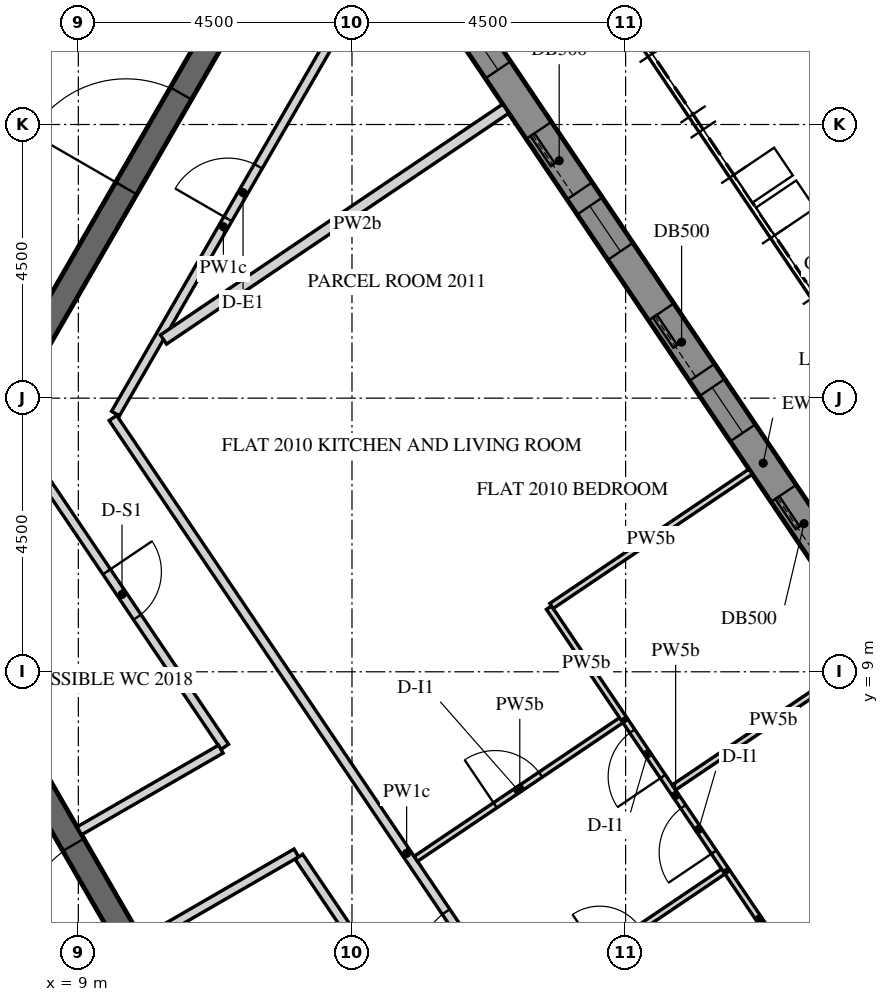
"""IFC4 building model, lengths in metres.
Left out: names, types, materials, properties, quantities, classifications, styles, units other than length and angle.
Written with IfcOpenShell. Run it as: python <this file> out.ifc"""

import sys

from ifc_helpers import new_model, si_unit, direction, frame, frame_2d, origin, place, context, subcontext, project, spatial, polyline, rectangle, outline, extrude, element, fill, save


model = new_model("IFC4")
c1 = context("Model", 3, precision=1e-05, world=origin(), true_north=direction((0.0, 1.0)))
c2 = subcontext(c1, "Body", "Model", "MODEL_VIEW")
j1 = project(units=[si_unit("LENGTHUNIT", "METRE"), si_unit("PLANEANGLEUNIT", "RADIAN")], contexts=[c1])
p1 = place(None, origin())
s1 = spatial("IfcSite", under=j1, at=p1, CompositionType="ELEMENT")
p2 = place(p1, origin())
s2 = spatial("IfcBuilding", under=s1, at=p2, CompositionType="ELEMENT")
p3 = place(p2, frame((0.0, 0.0, 256.2)))
s3 = spatial("IfcBuildingStorey", under=s2, at=p3, CompositionType="ELEMENT", Elevation=256.2)
p4 = place(p3, frame((26.706, 2.879, 0.0), z_axis=(0.0, 0.0, 1.0), x_axis=(-0.559197891507, 0.829034208061, 0.0)))
e1 = element("IfcWall", 1, at=p4, inside=s3, PredefinedType="SOLIDWALL", context=c2, shape_type="SweptSolid", body=[
    extrude(outline(polyline([(0.25, -0.25), (22.795, -0.25), (23.295, 0.25), (-0.25, 0.25), (0.25, -0.25)])), origin(), (0.0, 0.0, 1.0), 3.75),
])
p5 = place(p4, frame((1.323, 0.0, 0.9)))
e2 = element("IfcOpeningElement", 2, at=p5, cuts=e1, PredefinedType="OPENING", context=c2, shape_type="SweptSolid", body=[
    extrude(rectangle(XDim=0.9, YDim=1.5, at=frame_2d((0.45, 0.75))), frame((0.0, 0.26, 0.0), z_axis=(0.0, -1.0, 0.0), x_axis=(1.0, 0.0, 0.0)), (0.0, 0.0, 1.0), 0.52),
])
p6 = place(p4, frame((2.522, 0.0, 0.0)))
e3 = element("IfcOpeningElement", 3, at=p6, cuts=e1, PredefinedType="OPENING", context=c2, shape_type="SweptSolid", body=[
    extrude(rectangle(XDim=1.2, YDim=2.4, at=frame_2d((0.6, 1.2))), frame((0.0, 0.26, 0.0), z_axis=(0.0, -1.0, 0.0), x_axis=(1.0, 0.0, 0.0)), (0.0, 0.0, 1.0), 0.52),
])
p7 = place(p4, frame((4.922, 0.0, 0.9)))
e4 = element("IfcOpeningElement", 4, at=p7, cuts=e1, PredefinedType="OPENING", context=c2, shape_type="SweptSolid", body=[
    extrude(rectangle(XDim=0.9, YDim=1.5, at=frame_2d((0.45, 0.75))), frame((0.0, 0.26, 0.0), z_axis=(0.0, -1.0, 0.0), x_axis=(1.0, 0.0, 0.0)), (0.0, 0.0, 1.0), 0.52),
])
p8 = place(p4, frame((6.122, 0.0, 0.0)))
e5 = element("IfcOpeningElement", 5, at=p8, cuts=e1, PredefinedType="OPENING", context=c2, shape_type="SweptSolid", body=[
    extrude(rectangle(XDim=1.2, YDim=2.4, at=frame_2d((0.6, 1.2))), frame((0.0, 0.26, 0.0), z_axis=(0.0, -1.0, 0.0), x_axis=(1.0, 0.0, 0.0)), (0.0, 0.0, 1.0), 0.52),
])
p9 = place(p4, frame((8.522, 0.0, 0.9)))
e6 = element("IfcOpeningElement", 6, at=p9, cuts=e1, PredefinedType="OPENING", context=c2, shape_type="SweptSolid", body=[
    extrude(rectangle(XDim=0.9, YDim=1.5, at=frame_2d((0.45, 0.75))), frame((0.0, 0.26, 0.0), z_axis=(0.0, -1.0, 0.0), x_axis=(1.0, 0.0, 0.0)), (0.0, 0.0, 1.0), 0.52),
])
p10 = place(p4, frame((9.722, 0.0, 0.0)))
e7 = element("IfcOpeningElement", 7, at=p10, cuts=e1, PredefinedType="OPENING", context=c2, shape_type="SweptSolid", body=[
    extrude(rectangle(XDim=1.2, YDim=2.4, at=frame_2d((0.6, 1.2))), frame((0.0, 0.26, 0.0), z_axis=(0.0, -1.0, 0.0), x_axis=(1.0, 0.0, 0.0)), (0.0, 0.0, 1.0), 0.52),
])
p11 = place(p4, frame((12.122, 0.0, 0.9)))
e8 = element("IfcOpeningElement", 8, at=p11, cuts=e1, PredefinedType="OPENING", context=c2, shape_type="SweptSolid", body=[
    extrude(rectangle(XDim=0.9, YDim=1.5, at=frame_2d((0.45, 0.75))), frame((0.0, 0.26, 0.0), z_axis=(0.0, -1.0, 0.0), x_axis=(1.0, 0.0, 0.0)), (0.0, 0.0, 1.0), 0.52),
])
p12 = place(p4, frame((13.323, 0.0, 0.0)))
e9 = element("IfcOpeningElement", 9, at=p12, cuts=e1, PredefinedType="OPENING", context=c2, shape_type="SweptSolid", body=[
    extrude(rectangle(XDim=1.2, YDim=2.4, at=frame_2d((0.6, 1.2))), frame((0.0, 0.26, 0.0), z_axis=(0.0, -1.0, 0.0), x_axis=(1.0, 0.0, 0.0)), (0.0, 0.0, 1.0), 0.52),
])
p13 = place(p4, frame((15.722, 0.0, 0.9)))
e10 = element("IfcOpeningElement", 10, at=p13, cuts=e1, PredefinedType="OPENING", context=c2, shape_type="SweptSolid", body=[
    extrude(rectangle(XDim=0.9, YDim=1.5, at=frame_2d((0.45, 0.75))), frame((0.0, 0.26, 0.0), z_axis=(0.0, -1.0, 0.0), x_axis=(1.0, 0.0, 0.0)), (0.0, 0.0, 1.0), 0.52),
])
p14 = place(p4, frame((16.922, 0.0, 0.0)))
e11 = element("IfcOpeningElement", 11, at=p14, cuts=e1, PredefinedType="OPENING", context=c2, shape_type="SweptSolid", body=[
    extrude(rectangle(XDim=1.2, YDim=2.4, at=frame_2d((0.6, 1.2))), frame((0.0, 0.26, 0.0), z_axis=(0.0, -1.0, 0.0), x_axis=(1.0, 0.0, 0.0)), (0.0, 0.0, 1.0), 0.52),
])
p15 = place(p4, frame((19.323, 0.0, 0.9)))
e12 = element("IfcOpeningElement", 12, at=p15, cuts=e1, PredefinedType="OPENING", context=c2, shape_type="SweptSolid", body=[
    extrude(rectangle(XDim=0.9, YDim=1.5, at=frame_2d((0.45, 0.75))), frame((0.0, 0.26, 0.0), z_axis=(0.0, -1.0, 0.0), x_axis=(1.0, 0.0, 0.0)), (0.0, 0.0, 1.0), 0.52),
])
p16 = place(p4, frame((20.522, 0.0, 0.0)))
e13 = element("IfcOpeningElement", 13, at=p16, cuts=e1, PredefinedType="OPENING", context=c2, shape_type="SweptSolid", body=[
    extrude(rectangle(XDim=1.2, YDim=2.4, at=frame_2d((0.6, 1.2))), frame((0.0, 0.26, 0.0), z_axis=(0.0, -1.0, 0.0), x_axis=(1.0, 0.0, 0.0)), (0.0, 0.0, 1.0), 0.52),
])
p17 = place(p3, frame((12.471, 0.0, 0.0), z_axis=(0.0, 0.0, 1.0), x_axis=(-0.499996419489, 0.866027470984, 0.0)))
e14 = element("IfcWall", 14, at=p17, inside=s3, PredefinedType="SHEAR", context=c2, shape_type="SweptSolid", body=[
    extrude(outline(polyline([(-0.115, -0.2), (12.586, -0.2), (12.355, 0.2), (0.115, 0.2), (-0.115, -0.2)])), origin(), (0.0, 0.0, 1.0), 3.75),
])
p18 = place(p17, frame((5.306, 0.0, 0.0)))
e15 = element("IfcOpeningElement", 15, at=p18, cuts=e14, PredefinedType="OPENING", context=c2, shape_type="SweptSolid", body=[
    extrude(rectangle(XDim=1.8, YDim=2.4, at=frame_2d((0.9, 1.2))), frame((0.0, 0.21, 0.0), z_axis=(0.0, -1.0, 0.0), x_axis=(1.0, 0.0, 0.0)), (0.0, 0.0, 1.0), 0.42),
])
p19 = place(p3, frame((6.351, 11.0, 0.0), z_axis=(0.0, 0.0, 1.0), x_axis=(0.499998894578, 0.866026041999, 0.0)))
e16 = element("IfcWall", 16, at=p19, inside=s3, PredefinedType="SHEAR", context=c2, shape_type="SweptSolid", body=[
    extrude(rectangle(XDim=15.544, YDim=0.4, at=frame_2d((7.772, 0.0))), origin(), (0.0, 0.0, 1.0), 3.75),
])
p20 = place(p19, frame((6.872, 0.0, 0.0)))
e17 = element("IfcOpeningElement", 17, at=p20, cuts=e16, PredefinedType="OPENING", context=c2, shape_type="SweptSolid", body=[
    extrude(rectangle(XDim=1.8, YDim=2.4, at=frame_2d((0.9, 1.2))), frame((0.0, 0.21, 0.0), z_axis=(0.0, -1.0, 0.0), x_axis=(1.0, 0.0, 0.0)), (0.0, 0.0, 1.0), 0.42),
])
p21 = place(p3, frame((19.228, -1.146, 0.0), z_axis=(0.0, 0.0, 1.0), x_axis=(-0.559190017735, 0.829039519001, 0.0)))
e18 = element("IfcWall", 18, at=p21, inside=s3, PredefinedType="PARTITIONING", context=c2, shape_type="SweptSolid", body=[
    extrude(rectangle(XDim=17.273, YDim=0.15, at=frame_2d((8.637, 0.0))), origin(), (0.0, 0.0, 1.0), 2.823),
])
p22 = place(p21, frame((6.478, 0.0, 0.0)))
e19 = element("IfcOpeningElement", 19, at=p22, cuts=e18, PredefinedType="OPENING", context=c2, shape_type="SweptSolid", body=[
    extrude(rectangle(XDim=1.0, YDim=2.1, at=frame_2d((0.5, 1.05))), frame((0.0, 0.085, 0.0), z_axis=(0.0, -1.0, 0.0), x_axis=(1.0, 0.0, 0.0)), (0.0, 0.0, 1.0), 0.17),
])
p23 = place(p3, frame((9.611, 13.246, 0.0), z_axis=(0.0, 0.0, 1.0), x_axis=(0.499994435258, 0.866028616566, 0.0)))
e20 = element("IfcWall", 20, at=p23, inside=s3, PredefinedType="PARTITIONING", context=c2, shape_type="SweptSolid", body=[
    extrude(rectangle(XDim=7.097, YDim=0.15, at=frame_2d((3.548, 0.0))), origin(), (0.0, 0.0, 1.0), 2.823),
])
p24 = place(p23, frame((3.696, 0.0, 0.0)))
e21 = element("IfcOpeningElement", 21, at=p24, cuts=e20, PredefinedType="OPENING", context=c2, shape_type="SweptSolid", body=[
    extrude(rectangle(XDim=1.0, YDim=2.1, at=frame_2d((0.5, 1.05))), frame((0.0, 0.085, 0.0), z_axis=(0.0, -1.0, 0.0), x_axis=(1.0, 0.0, 0.0)), (0.0, 0.0, 1.0), 0.17),
])
p25 = place(p3, frame((10.066, 4.566, 0.0), z_axis=(0.0, 0.0, 1.0), x_axis=(0.866034661658, 0.49998396455, 0.0)))
e22 = element("IfcWall", 22, at=p25, inside=s3, PredefinedType="PARTITIONING", context=c2, shape_type="SweptSolid", body=[
    extrude(rectangle(XDim=2.909, YDim=0.15, at=frame_2d((1.455, 0.0))), origin(), (0.0, 0.0, 1.0), 2.823),
])
p26 = place(p3, frame((12.627, 5.958, 0.0), z_axis=(0.0, 0.0, 1.0), x_axis=(0.559185493191, -0.829042570804, 0.0)))
e23 = element("IfcWall", 23, at=p26, inside=s3, PredefinedType="PARTITIONING", context=c2, shape_type="SweptSolid", body=[
    extrude(rectangle(XDim=8.727, YDim=0.15, at=frame_2d((4.363, 0.0))), origin(), (0.0, 0.0, 1.0), 2.823),
])
p27 = place(p26, frame((3.913, 0.0, 0.0)))
e24 = element("IfcOpeningElement", 24, at=p27, cuts=e23, PredefinedType="OPENING", context=c2, shape_type="SweptSolid", body=[
    extrude(rectangle(XDim=0.9, YDim=2.1, at=frame_2d((0.45, 1.05))), frame((0.0, 0.085, 0.0), z_axis=(0.0, -1.0, 0.0), x_axis=(1.0, 0.0, 0.0)), (0.0, 0.0, 1.0), 0.17),
])
p28 = place(p3, frame((8.028, 12.777, 0.0), z_axis=(0.0, 0.0, 1.0), x_axis=(0.559175239609, -0.829049486707, 0.0)))
e25 = element("IfcWall", 25, at=p28, inside=s3, PredefinedType="PARTITIONING", context=c2, shape_type="SweptSolid", body=[
    extrude(rectangle(XDim=6.045, YDim=0.15, at=frame_2d((3.022, 0.0))), origin(), (0.0, 0.0, 1.0), 2.823),
])
p29 = place(p28, frame((2.572, 0.0, 0.0)))
e26 = element("IfcOpeningElement", 26, at=p29, cuts=e25, PredefinedType="OPENING", context=c2, shape_type="SweptSolid", body=[
    extrude(rectangle(XDim=0.9, YDim=2.1, at=frame_2d((0.45, 1.05))), frame((0.0, 0.085, 0.0), z_axis=(0.0, -1.0, 0.0), x_axis=(1.0, 0.0, 0.0)), (0.0, 0.0, 1.0), 0.17),
])
p30 = place(p3, frame((11.343, 7.728, 0.0), z_axis=(0.0, 0.0, 1.0), x_axis=(-0.866037314867, -0.499979368833, 0.0)))
e27 = element("IfcWall", 27, at=p30, inside=s3, PredefinedType="PARTITIONING", context=c2, shape_type="SweptSolid", body=[
    extrude(rectangle(XDim=2.687, YDim=0.15, at=frame_2d((1.344, 0.0))), origin(), (0.0, 0.0, 1.0), 2.823),
])
p31 = place(p3, frame((24.082, 6.323, 0.0), z_axis=(0.0, 0.0, 1.0), x_axis=(-0.829033253898, -0.55919930609, 0.0)))
e28 = element("IfcWall", 28, at=p31, inside=s3, PredefinedType="PARTITIONING", context=c2, shape_type="SweptSolid", body=[
    extrude(rectangle(XDim=8.125, YDim=0.18, at=frame_2d((4.062, 0.0))), origin(), (0.0, 0.0, 1.0), 2.823),
])
p32 = place(p3, frame((14.55, 5.924, 0.0), z_axis=(0.0, 0.0, 1.0), x_axis=(0.829005765264, 0.559240056827, 0.0)))
e29 = element("IfcWall", 29, at=p32, inside=s3, PredefinedType="PARTITIONING", context=c2, shape_type="SweptSolid", body=[
    extrude(rectangle(XDim=4.125, YDim=0.1, at=frame_2d((2.062, 0.0))), origin(), (0.0, 0.0, 1.0), 2.823),
])
p33 = place(p32, frame((1.575, 0.0, 0.0)))
e30 = element("IfcOpeningElement", 30, at=p33, cuts=e29, PredefinedType="OPENING", context=c2, shape_type="SweptSolid", body=[
    extrude(rectangle(XDim=0.9, YDim=2.1, at=frame_2d((0.45, 1.05))), frame((0.0, 0.06, 0.0), z_axis=(0.0, -1.0, 0.0), x_axis=(1.0, 0.0, 0.0)), (0.0, 0.0, 1.0), 0.12),
])
p34 = place(p3, frame((17.971, 8.229, 0.0), z_axis=(0.0, 0.0, 1.0), x_axis=(-0.559246231198, 0.829001600053, 0.0)))
e31 = element("IfcWall", 31, at=p34, inside=s3, PredefinedType="PARTITIONING", context=c2, shape_type="SweptSolid", body=[
    extrude(rectangle(XDim=2.202, YDim=0.1, at=frame_2d((1.101, 0.0))), origin(), (0.0, 0.0, 1.0), 2.823),
])
p35 = place(p3, frame((16.781, 10.083, 0.0), z_axis=(0.0, 0.0, 1.0), x_axis=(0.829042808667, 0.559185140536, 0.0)))
e32 = element("IfcWall", 32, at=p35, inside=s3, PredefinedType="PARTITIONING", context=c2, shape_type="SweptSolid", body=[
    extrude(rectangle(XDim=3.95, YDim=0.1, at=frame_2d((1.975, 0.0))), origin(), (0.0, 0.0, 1.0), 2.823),
])
p36 = place(p3, frame((16.029, 18.26, 0.0), z_axis=(0.0, 0.0, 1.0), x_axis=(-0.82904538001, -0.559181328268, 0.0)))
e33 = element("IfcWall", 33, at=p36, inside=s3, PredefinedType="PARTITIONING", context=c2, shape_type="SweptSolid", body=[
    extrude(rectangle(XDim=6.79, YDim=0.18, at=frame_2d((3.395, 0.0))), origin(), (0.0, 0.0, 1.0), 2.823),
])
p37 = place(p3, frame((16.227, 3.437, 0.0), z_axis=(0.0, 0.0, 1.0), x_axis=(0.829033204172, 0.559199379811, 0.0)))
e34 = element("IfcWall", 34, at=p37, inside=s3, PredefinedType="PARTITIONING", context=c2, shape_type="SweptSolid", body=[
    extrude(rectangle(XDim=4.125, YDim=0.1, at=frame_2d((2.062, 0.0))), origin(), (0.0, 0.0, 1.0), 2.823),
])
p38 = place(p37, frame((1.625, 0.0, 0.0)))
e35 = element("IfcOpeningElement", 35, at=p38, cuts=e34, PredefinedType="OPENING", context=c2, shape_type="SweptSolid", body=[
    extrude(rectangle(XDim=0.8, YDim=2.1, at=frame_2d((0.4, 1.05))), frame((0.0, 0.06, 0.0), z_axis=(0.0, -1.0, 0.0), x_axis=(1.0, 0.0, 0.0)), (0.0, 0.0, 1.0), 0.12),
])
p39 = place(p3, frame((19.648, 5.742, 0.0), z_axis=(0.0, 0.0, 1.0), x_axis=(-0.559193191328, 0.829037378393, 0.0)))
e36 = element("IfcWall", 36, at=p39, inside=s3, PredefinedType="PARTITIONING", context=c2, shape_type="SweptSolid", body=[
    extrude(rectangle(XDim=2.954, YDim=0.1, at=frame_2d((1.477, 0.0))), origin(), (0.0, 0.0, 1.0), 2.823),
])
p40 = place(p39, frame((0.352, 0.0, 0.0)))
e37 = element("IfcOpeningElement", 37, at=p40, cuts=e36, PredefinedType="OPENING", context=c2, shape_type="SweptSolid", body=[
    extrude(rectangle(XDim=0.9, YDim=2.1, at=frame_2d((0.45, 1.05))), frame((0.0, 0.06, 0.0), z_axis=(0.0, -1.0, 0.0), x_axis=(1.0, 0.0, 0.0)), (0.0, 0.0, 1.0), 0.12),
])
p41 = place(p39, frame((1.852, 0.0, 0.0)))
e38 = element("IfcOpeningElement", 38, at=p41, cuts=e36, PredefinedType="OPENING", context=c2, shape_type="SweptSolid", body=[
    extrude(rectangle(XDim=0.9, YDim=2.1, at=frame_2d((0.45, 1.05))), frame((0.0, 0.06, 0.0), z_axis=(0.0, -1.0, 0.0), x_axis=(1.0, 0.0, 0.0)), (0.0, 0.0, 1.0), 0.12),
])
p42 = place(p3, frame((20.715, 4.16, 0.0), z_axis=(0.0, 0.0, 1.0), x_axis=(-0.559200351269, 0.829032548903, 0.0)))
e39 = element("IfcWall", 39, at=p42, inside=s3, PredefinedType="PARTITIONING", context=c2, shape_type="SweptSolid", body=[
    extrude(rectangle(XDim=1.862, YDim=0.1, at=frame_2d((0.931, 0.0))), origin(), (0.0, 0.0, 1.0), 2.823),
])
p43 = place(p3, frame((22.069, 9.307, 0.0), z_axis=(0.0, 0.0, 1.0), x_axis=(-0.829062134085, -0.559156487779, 0.0)))
e40 = element("IfcWall", 40, at=p43, inside=s3, PredefinedType="PARTITIONING", context=c2, shape_type="SweptSolid", body=[
    extrude(rectangle(XDim=3.95, YDim=0.1, at=frame_2d((1.975, 0.0))), origin(), (0.0, 0.0, 1.0), 2.823),
])
p44 = place(p10, frame((0.0, 0.175, 0.0)))
e41 = element("IfcDoor", 41, at=p44, inside=s3, OperationType="SLIDING_TO_LEFT", PredefinedType="DOOR", context=c2, shape_type="SweptSolid", body=[
    extrude(rectangle(XDim=1.2, YDim=2.4, at=frame_2d((0.6, 1.2))), frame((0.0, 0.025, 0.0), z_axis=(0.0, -1.0, 0.0), x_axis=(1.0, 0.0, 0.0)), (0.0, 0.0, 1.0), 0.05),
])
fill(e7, e41)
p45 = place(p11, frame((0.0, 0.18, 0.0)))
e42 = element("IfcWindow", 42, at=p45, inside=s3, PartitioningType="SINGLE_PANEL", PredefinedType="WINDOW", context=c2, shape_type="SweptSolid", body=[
    extrude(rectangle(XDim=0.9, YDim=1.5, at=frame_2d((0.45, 0.75))), frame((0.0, 0.03, 0.0), z_axis=(0.0, -1.0, 0.0), x_axis=(1.0, 0.0, 0.0)), (0.0, 0.0, 1.0), 0.06),
])
fill(e8, e42)
p46 = place(p12, frame((0.0, 0.175, 0.0)))
e43 = element("IfcDoor", 43, at=p46, inside=s3, OperationType="SLIDING_TO_LEFT", PredefinedType="DOOR", context=c2, shape_type="SweptSolid", body=[
    extrude(rectangle(XDim=1.2, YDim=2.4, at=frame_2d((0.6, 1.2))), frame((0.0, 0.025, 0.0), z_axis=(0.0, -1.0, 0.0), x_axis=(1.0, 0.0, 0.0)), (0.0, 0.0, 1.0), 0.05),
])
fill(e9, e43)
p47 = place(p13, frame((0.0, 0.18, 0.0)))
e44 = element("IfcWindow", 44, at=p47, inside=s3, PartitioningType="SINGLE_PANEL", PredefinedType="WINDOW", context=c2, shape_type="SweptSolid", body=[
    extrude(rectangle(XDim=0.9, YDim=1.5, at=frame_2d((0.45, 0.75))), frame((0.0, 0.03, 0.0), z_axis=(0.0, -1.0, 0.0), x_axis=(1.0, 0.0, 0.0)), (0.0, 0.0, 1.0), 0.06),
])
fill(e10, e44)
p48 = place(p14, frame((0.0, 0.175, 0.0)))
e45 = element("IfcDoor", 45, at=p48, inside=s3, OperationType="SLIDING_TO_LEFT", PredefinedType="DOOR", context=c2, shape_type="SweptSolid", body=[
    extrude(rectangle(XDim=1.2, YDim=2.4, at=frame_2d((0.6, 1.2))), frame((0.0, 0.025, 0.0), z_axis=(0.0, -1.0, 0.0), x_axis=(1.0, 0.0, 0.0)), (0.0, 0.0, 1.0), 0.05),
])
fill(e11, e45)
p49 = place(p15, frame((0.0, 0.18, 0.0)))
e46 = element("IfcWindow", 46, at=p49, inside=s3, PartitioningType="SINGLE_PANEL", PredefinedType="WINDOW", context=c2, shape_type="SweptSolid", body=[
    extrude(rectangle(XDim=0.9, YDim=1.5, at=frame_2d((0.45, 0.75))), frame((0.0, 0.03, 0.0), z_axis=(0.0, -1.0, 0.0), x_axis=(1.0, 0.0, 0.0)), (0.0, 0.0, 1.0), 0.06),
])
fill(e12, e46)
p50 = place(p18, origin())
e47 = element("IfcDoor", 47, at=p50, inside=s3, OperationType="DOUBLE_DOOR_SINGLE_SWING", PredefinedType="DOOR", context=c2, shape_type="SweptSolid", body=[
    extrude(rectangle(XDim=1.8, YDim=2.4, at=frame_2d((0.9, 1.2))), frame((0.0, 0.025, 0.0), z_axis=(0.0, -1.0, 0.0), x_axis=(1.0, 0.0, 0.0)), (0.0, 0.0, 1.0), 0.05),
])
fill(e15, e47)
p51 = place(p20, origin())
e48 = element("IfcDoor", 48, at=p51, inside=s3, OperationType="DOUBLE_DOOR_SINGLE_SWING", PredefinedType="DOOR", context=c2, shape_type="SweptSolid", body=[
    extrude(rectangle(XDim=1.8, YDim=2.4, at=frame_2d((0.9, 1.2))), frame((0.0, 0.025, 0.0), z_axis=(0.0, -1.0, 0.0), x_axis=(1.0, 0.0, 0.0)), (0.0, 0.0, 1.0), 0.05),
])
fill(e17, e48)
p52 = place(p22, origin())
e49 = element("IfcDoor", 49, at=p52, inside=s3, OperationType="SINGLE_SWING_RIGHT", PredefinedType="DOOR", context=c2, shape_type="SweptSolid", body=[
    extrude(rectangle(XDim=1.0, YDim=2.1, at=frame_2d((0.5, 1.05))), frame((0.0, 0.025, 0.0), z_axis=(0.0, -1.0, 0.0), x_axis=(1.0, 0.0, 0.0)), (0.0, 0.0, 1.0), 0.05),
])
fill(e19, e49)
p53 = place(p33, origin())
e50 = element("IfcDoor", 50, at=p53, inside=s3, OperationType="SINGLE_SWING_RIGHT", PredefinedType="DOOR", context=c2, shape_type="SweptSolid", body=[
    extrude(rectangle(XDim=0.9, YDim=2.1, at=frame_2d((0.45, 1.05))), frame((0.0, 0.025, 0.0), z_axis=(0.0, -1.0, 0.0), x_axis=(1.0, 0.0, 0.0)), (0.0, 0.0, 1.0), 0.05),
])
fill(e30, e50)
p54 = place(p40, origin())
e51 = element("IfcDoor", 51, at=p54, inside=s3, OperationType="SINGLE_SWING_RIGHT", PredefinedType="DOOR", context=c2, shape_type="SweptSolid", body=[
    extrude(rectangle(XDim=0.9, YDim=2.1, at=frame_2d((0.45, 1.05))), frame((0.0, 0.025, 0.0), z_axis=(0.0, -1.0, 0.0), x_axis=(1.0, 0.0, 0.0)), (0.0, 0.0, 1.0), 0.05),
])
fill(e37, e51)
p55 = place(p41, origin())
e52 = element("IfcDoor", 52, at=p55, inside=s3, OperationType="SINGLE_SWING_LEFT", PredefinedType="DOOR", context=c2, shape_type="SweptSolid", body=[
    extrude(rectangle(XDim=0.9, YDim=2.1, at=frame_2d((0.45, 1.05))), frame((0.0, 0.025, 0.0), z_axis=(0.0, -1.0, 0.0), x_axis=(1.0, 0.0, 0.0)), (0.0, 0.0, 1.0), 0.05),
])
fill(e38, e52)
p56 = place(p24, origin())
e53 = element("IfcDoor", 53, at=p56, inside=s3, OperationType="SINGLE_SWING_RIGHT", PredefinedType="DOOR", context=c2, shape_type="SweptSolid", body=[
    extrude(rectangle(XDim=1.0, YDim=2.1, at=frame_2d((0.5, 1.05))), frame((0.0, 0.025, 0.0), z_axis=(0.0, -1.0, 0.0), x_axis=(1.0, 0.0, 0.0)), (0.0, 0.0, 1.0), 0.05),
])
fill(e21, e53)
p57 = place(p29, origin())
e54 = element("IfcDoor", 54, at=p57, inside=s3, OperationType="SINGLE_SWING_RIGHT", PredefinedType="DOOR", context=c2, shape_type="SweptSolid", body=[
    extrude(rectangle(XDim=0.9, YDim=2.1, at=frame_2d((0.45, 1.05))), frame((0.0, 0.025, 0.0), z_axis=(0.0, -1.0, 0.0), x_axis=(1.0, 0.0, 0.0)), (0.0, 0.0, 1.0), 0.05),
])
fill(e26, e54)
save(model, sys.argv[1])
